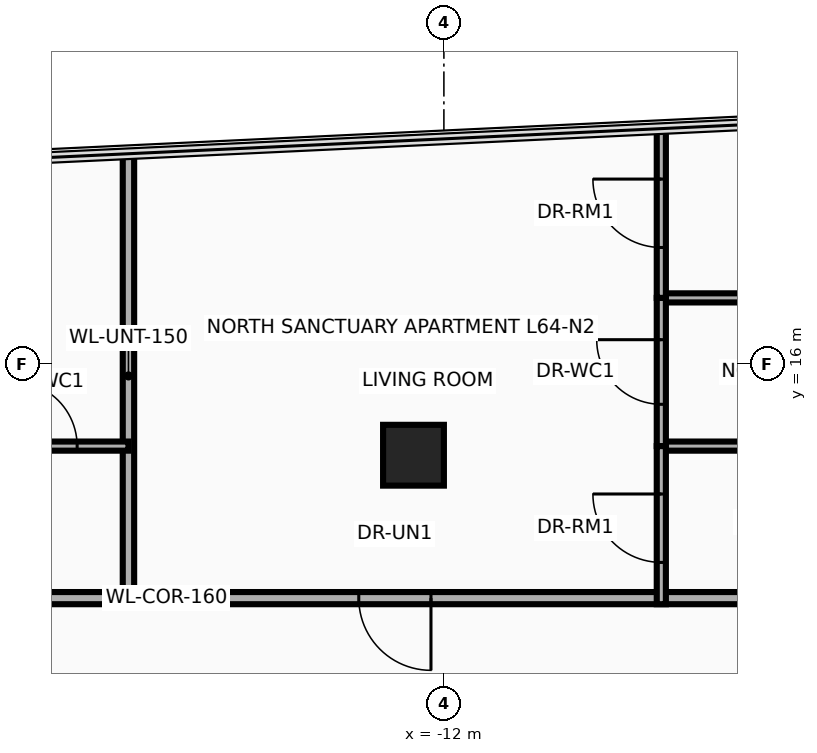
"""IFC4 building model, lengths in metres.
Left out: names, types, materials, properties, quantities, classifications, styles, units other than length and angle.
Written with IfcOpenShell. Run it as: python <this file> out.ifc"""

import sys

from ifc_helpers import new_model, si_unit, direction, frame, frame_2d, origin, origin_2d, place, context, subcontext, project, spatial, rectangle, extrude, source, transform, mapped, element, fill, save


model = new_model("IFC4")
c1 = context("Model", 3, precision=1e-05, world=origin(), true_north=direction((0.0, 1.0)))
c2 = subcontext(c1, "Body", "Model", "MODEL_VIEW")
j1 = project(units=[si_unit("LENGTHUNIT", "METRE"), si_unit("PLANEANGLEUNIT", "RADIAN")], contexts=[c1])
p1 = place(None, origin())
s1 = spatial("IfcSite", under=j1, at=p1, CompositionType="ELEMENT")
p2 = place(p1, origin())
s2 = spatial("IfcBuilding", under=s1, at=p2, CompositionType="ELEMENT")
p3 = place(p2, frame((0.0, 0.0, 247.5)))
s3 = spatial("IfcBuildingStorey", under=s2, at=p3, CompositionType="ELEMENT", Elevation=247.5)
m1 = source(origin(), c2, "Body", "SweptSolid", [
    extrude(rectangle(XDim=0.8, YDim=0.8, at=origin_2d()), origin(), (0.0, 0.0, 1.0), 3.5),
])
p4 = place(p3, frame((-12.4, 14.8, 0.0), z_axis=(0.0, 0.0, 1.0), x_axis=(1.0, 0.0, 0.0)))
e1 = element("IfcColumn", 1, at=p4, inside=s3, PredefinedType="COLUMN", context=c2, shape_type="MappedRepresentation", body=[
    mapped(m1, transform((0.0, 0.0, 0.0), x_axis=(1.0, 0.0, 0.0), y_axis=(0.0, 1.0, 0.0), z_axis=(0.0, 0.0, 1.0), scale=1.0)),
])
p5 = place(p3, frame((-30.39, 12.92, 0.0), z_axis=(0.0, 0.0, 1.0), x_axis=(1.0, 0.0, 0.0)))
e2 = element("IfcWall", 2, at=p5, inside=s3, PredefinedType="PARTITIONING", context=c2, shape_type="SweptSolid", body=[
    extrude(rectangle(XDim=29.48, YDim=0.16, at=frame_2d((14.74, 0.0))), origin(), (0.0, 0.0, 1.0), 2.634),
])
p6 = place(p5, frame((3.085, 0.0, 0.0)))
e3 = element("IfcOpeningElement", 3, at=p6, cuts=e2, PredefinedType="OPENING", context=c2, shape_type="SweptSolid", body=[
    extrude(rectangle(XDim=0.95, YDim=2.15, at=frame_2d((0.475, 1.075))), frame((0.0, 0.095, 0.0), z_axis=(0.0, -1.0, 0.0), x_axis=(1.0, 0.0, 0.0)), (0.0, 0.0, 1.0), 0.19),
])
p7 = place(p5, frame((9.105, 0.0, 0.0)))
e4 = element("IfcOpeningElement", 4, at=p7, cuts=e2, PredefinedType="OPENING", context=c2, shape_type="SweptSolid", body=[
    extrude(rectangle(XDim=0.95, YDim=2.15, at=frame_2d((0.475, 1.075))), frame((0.0, 0.095, 0.0), z_axis=(0.0, -1.0, 0.0), x_axis=(1.0, 0.0, 0.0)), (0.0, 0.0, 1.0), 0.19),
])
p8 = place(p5, frame((17.27, 0.0, 0.0)))
e5 = element("IfcOpeningElement", 5, at=p8, cuts=e2, PredefinedType="OPENING", context=c2, shape_type="SweptSolid", body=[
    extrude(rectangle(XDim=0.95, YDim=2.15, at=frame_2d((0.475, 1.075))), frame((0.0, 0.095, 0.0), z_axis=(0.0, -1.0, 0.0), x_axis=(1.0, 0.0, 0.0)), (0.0, 0.0, 1.0), 0.19),
])
p9 = place(p3, frame((-16.15, 12.92, 0.0), z_axis=(0.0, 0.0, 1.0), x_axis=(0.0, 1.0, 0.0)))
e6 = element("IfcWall", 6, at=p9, inside=s3, PredefinedType="PARTITIONING", context=c2, shape_type="SweptSolid", body=[
    extrude(rectangle(XDim=5.846, YDim=0.15, at=frame_2d((2.923, 0.0))), origin(), (0.0, 0.0, 1.0), 2.544),
])
p10 = place(p3, frame((-18.35, 14.92, 0.0), z_axis=(0.0, 0.0, 1.0), x_axis=(1.0, 0.0, 0.0)))
e7 = element("IfcWall", 7, at=p10, inside=s3, PredefinedType="PARTITIONING", context=c2, shape_type="SweptSolid", body=[
    extrude(rectangle(XDim=2.2, YDim=0.12, at=frame_2d((1.1, 0.0))), origin(), (0.0, 0.0, 1.0), 2.544),
])
p11 = place(p10, frame((0.675, 0.0, 0.0)))
e8 = element("IfcOpeningElement", 8, at=p11, cuts=e7, PredefinedType="OPENING", context=c2, shape_type="SweptSolid", body=[
    extrude(rectangle(XDim=0.85, YDim=2.1, at=frame_2d((0.425, 1.05))), frame((0.0, 0.075, 0.0), z_axis=(0.0, -1.0, 0.0), x_axis=(1.0, 0.0, 0.0)), (0.0, 0.0, 1.0), 0.15),
])
p12 = place(p3, frame((-9.14, 14.92, 0.0), z_axis=(0.0, 0.0, 1.0), x_axis=(1.0, 0.0, 0.0)))
e9 = element("IfcWall", 9, at=p12, inside=s3, PredefinedType="PARTITIONING", context=c2, shape_type="SweptSolid", body=[
    extrude(rectangle(XDim=8.23, YDim=0.12, at=frame_2d((4.115, 0.0))), origin(), (0.0, 0.0, 1.0), 3.26),
])
p13 = place(p3, frame((-9.14, 16.87, 0.0), z_axis=(0.0, 0.0, 1.0), x_axis=(1.0, 0.0, 0.0)))
e10 = element("IfcWall", 10, at=p13, inside=s3, PredefinedType="PARTITIONING", context=c2, shape_type="SweptSolid", body=[
    extrude(rectangle(XDim=7.972, YDim=0.12, at=frame_2d((3.986, 0.0))), origin(), (0.0, 0.0, 1.0), 3.26),
])
p14 = place(p3, frame((-9.14, 14.92, 0.0), z_axis=(0.0, 0.0, 1.0), x_axis=(0.0, 1.0, 0.0)))
e11 = element("IfcWall", 11, at=p14, inside=s3, PredefinedType="PARTITIONING", context=c2, shape_type="SweptSolid", body=[
    extrude(rectangle(XDim=1.95, YDim=0.12, at=frame_2d((0.975, 0.0))), origin(), (0.0, 0.0, 1.0), 3.26),
])
p15 = place(p14, frame((0.55, 0.0, 0.0)))
e12 = element("IfcOpeningElement", 12, at=p15, cuts=e11, PredefinedType="OPENING", context=c2, shape_type="SweptSolid", body=[
    extrude(rectangle(XDim=0.85, YDim=2.1, at=frame_2d((0.425, 1.05))), frame((0.0, 0.075, 0.0), z_axis=(0.0, -1.0, 0.0), x_axis=(1.0, 0.0, 0.0)), (0.0, 0.0, 1.0), 0.15),
])
p16 = place(p3, frame((-9.14, 12.84, 0.0), z_axis=(0.0, 0.0, 1.0), x_axis=(0.0, 1.0, 0.0)))
e13 = element("IfcWall", 13, at=p16, inside=s3, PredefinedType="PARTITIONING", context=c2, shape_type="SweptSolid", body=[
    extrude(rectangle(XDim=2.08, YDim=0.12, at=frame_2d((1.04, 0.0))), origin(), (0.0, 0.0, 1.0), 3.26),
])
p17 = place(p16, frame((0.55, 0.0, 0.0)))
e14 = element("IfcOpeningElement", 14, at=p17, cuts=e13, PredefinedType="OPENING", context=c2, shape_type="SweptSolid", body=[
    extrude(rectangle(XDim=0.9, YDim=2.1, at=frame_2d((0.45, 1.05))), frame((0.0, 0.075, 0.0), z_axis=(0.0, -1.0, 0.0), x_axis=(1.0, 0.0, 0.0)), (0.0, 0.0, 1.0), 0.15),
])
p18 = place(p3, frame((-9.14, 16.87, 0.0), z_axis=(0.0, 0.0, 1.0), x_axis=(0.0, 1.0, 0.0)))
e15 = element("IfcWall", 15, at=p18, inside=s3, PredefinedType="PARTITIONING", context=c2, shape_type="SweptSolid", body=[
    extrude(rectangle(XDim=2.227, YDim=0.12, at=frame_2d((1.113, 0.0))), origin(), (0.0, 0.0, 1.0), 3.26),
])
p19 = place(p18, frame((0.663, 0.0, 0.0)))
e16 = element("IfcOpeningElement", 16, at=p19, cuts=e15, PredefinedType="OPENING", context=c2, shape_type="SweptSolid", body=[
    extrude(rectangle(XDim=0.9, YDim=2.1, at=frame_2d((0.45, 1.05))), frame((0.0, 0.075, 0.0), z_axis=(0.0, -1.0, 0.0), x_axis=(1.0, 0.0, 0.0)), (0.0, 0.0, 1.0), 0.15),
])
p20 = place(p11, origin())
e17 = element("IfcDoor", 17, at=p20, inside=s3, OperationType="SINGLE_SWING_RIGHT", PredefinedType="DOOR", context=c2, shape_type="SweptSolid", body=[
    extrude(rectangle(XDim=0.85, YDim=2.1, at=frame_2d((0.425, 1.05))), frame((0.0, 0.025, 0.0), z_axis=(0.0, -1.0, 0.0), x_axis=(1.0, 0.0, 0.0)), (0.0, 0.0, 1.0), 0.05),
])
fill(e8, e17)
p21 = place(p8, frame((0.95, 0.0, 0.0), z_axis=(0.0, 0.0, 1.0), x_axis=(-1.0, 0.0, 0.0)))
e18 = element("IfcDoor", 18, at=p21, inside=s3, OperationType="SINGLE_SWING_LEFT", PredefinedType="DOOR", context=c2, shape_type="SweptSolid", body=[
    extrude(rectangle(XDim=0.95, YDim=2.15, at=frame_2d((0.475, 1.075))), frame((0.0, 0.025, 0.0), z_axis=(0.0, -1.0, 0.0), x_axis=(1.0, 0.0, 0.0)), (0.0, 0.0, 1.0), 0.05),
])
fill(e5, e18)
p22 = place(p15, origin())
e19 = element("IfcDoor", 19, at=p22, inside=s3, OperationType="SINGLE_SWING_RIGHT", PredefinedType="DOOR", context=c2, shape_type="SweptSolid", body=[
    extrude(rectangle(XDim=0.85, YDim=2.1, at=frame_2d((0.425, 1.05))), frame((0.0, 0.025, 0.0), z_axis=(0.0, -1.0, 0.0), x_axis=(1.0, 0.0, 0.0)), (0.0, 0.0, 1.0), 0.05),
])
fill(e12, e19)
p23 = place(p17, origin())
e20 = element("IfcDoor", 20, at=p23, inside=s3, OperationType="SINGLE_SWING_LEFT", PredefinedType="DOOR", context=c2, shape_type="SweptSolid", body=[
    extrude(rectangle(XDim=0.9, YDim=2.1, at=frame_2d((0.45, 1.05))), frame((0.0, 0.025, 0.0), z_axis=(0.0, -1.0, 0.0), x_axis=(1.0, 0.0, 0.0)), (0.0, 0.0, 1.0), 0.05),
])
fill(e14, e20)
p24 = place(p19, origin())
e21 = element("IfcDoor", 21, at=p24, inside=s3, OperationType="SINGLE_SWING_RIGHT", PredefinedType="DOOR", context=c2, shape_type="SweptSolid", body=[
    extrude(rectangle(XDim=0.9, YDim=2.1, at=frame_2d((0.45, 1.05))), frame((0.0, 0.025, 0.0), z_axis=(0.0, -1.0, 0.0), x_axis=(1.0, 0.0, 0.0)), (0.0, 0.0, 1.0), 0.05),
])
fill(e16, e21)
save(model, sys.argv[1])
